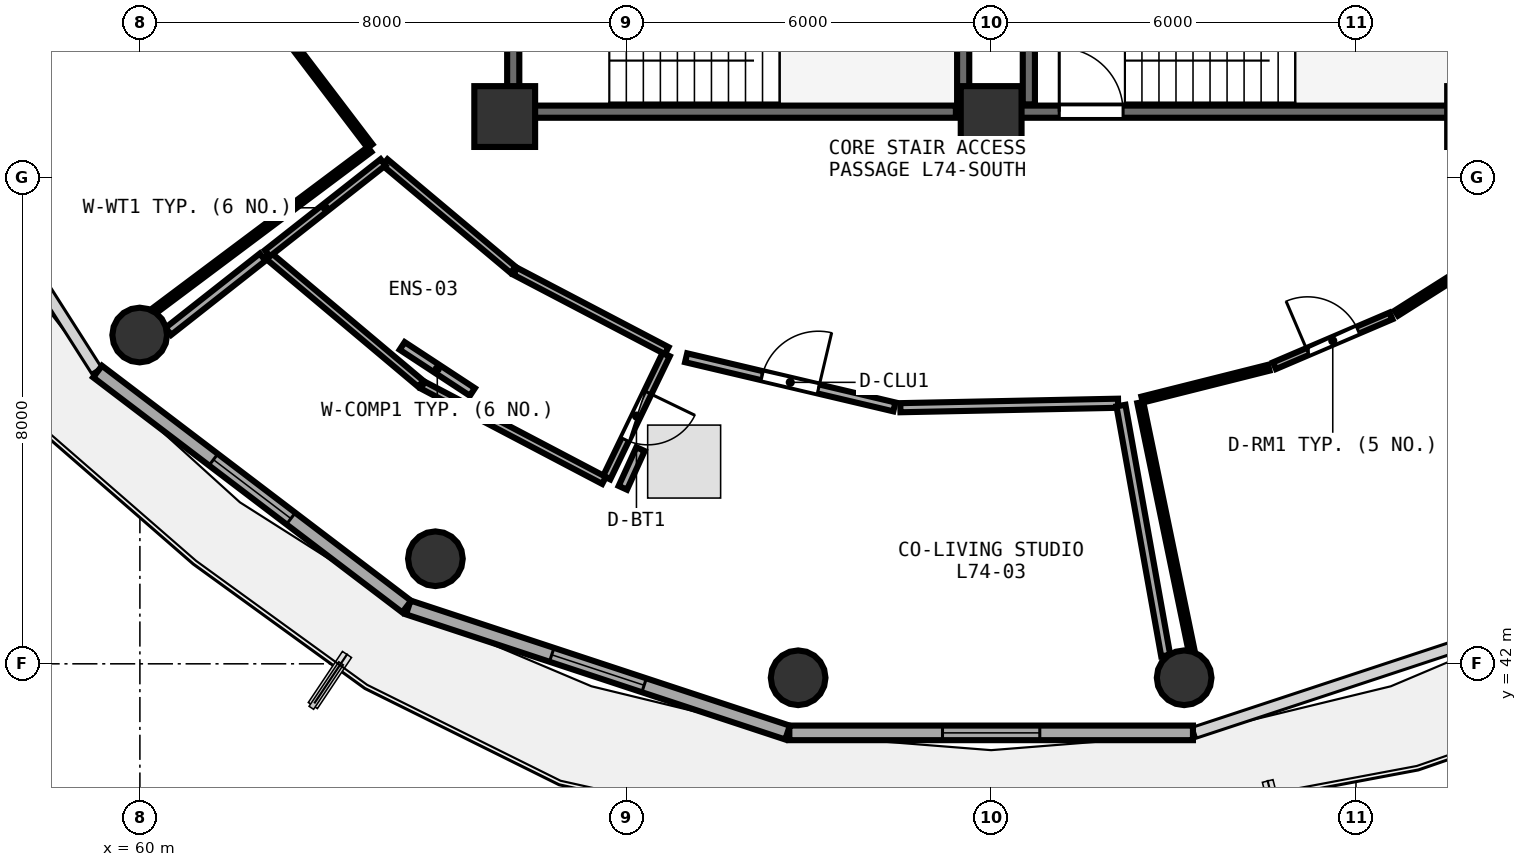
"""IFC4 building model, lengths in metres.
Left out: names, types, materials, properties, quantities, classifications, styles, units other than length and angle.
Written with IfcOpenShell. Run it as: python <this file> out.ifc"""

import sys

from ifc_helpers import new_model, si_unit, direction, frame, frame_2d, origin, origin_2d, place, context, subcontext, project, spatial, rectangle, circle, extrude, element, fill, save


model = new_model("IFC4")
c1 = context("Model", 3, precision=1e-05, world=origin(), true_north=direction((0.0, 1.0)))
c2 = subcontext(c1, "Body", "Model", "MODEL_VIEW")
j1 = project(units=[si_unit("LENGTHUNIT", "METRE"), si_unit("PLANEANGLEUNIT", "RADIAN")], contexts=[c1])
p1 = place(None, origin())
s1 = spatial("IfcSite", under=j1, at=p1, CompositionType="ELEMENT")
p2 = place(p1, origin())
s2 = spatial("IfcBuilding", under=s1, at=p2, CompositionType="ELEMENT")
p3 = place(p2, frame((0.0, 0.0, 289.95)))
s3 = spatial("IfcBuildingStorey", under=s2, at=p3, CompositionType="ELEMENT", Elevation=289.95)
for number, where, z_axis, x_axis in (
    (1, (66.0, 51.0, 0.0), (0.0, 0.0, 1.0), (1.0, 0.0, 0.0)),
    (2, (74.0, 51.0, 0.0), (0.0, 0.0, 1.0), (1.0, 0.0, 0.0)),
):
    element("IfcColumn", number, at=place(p3, frame(where, z_axis=z_axis, x_axis=x_axis)), inside=s3, PredefinedType="PILASTER", context=c2, shape_type="SweptSolid", body=[
        extrude(rectangle(XDim=1.0, YDim=1.0, at=origin_2d()), origin(), (0.0, 0.0, 1.0), 3.75),
    ])
for number, where, z_axis, x_axis in (
    (3, (59.997, 47.407, 0.0), (0.0, 0.0, 1.0), (1.0, 0.0, 0.0)),
    (4, (64.86, 43.728, 0.0), (0.0, 0.0, 1.0), (1.0, 0.0, 0.0)),
    (5, (70.826, 41.771, 0.0), (0.0, 0.0, 1.0), (1.0, 0.0, 0.0)),
    (6, (77.174, 41.771, 0.0), (0.0, 0.0, 1.0), (1.0, 0.0, 0.0)),
):
    element("IfcColumn", number, at=place(p3, frame(where, z_axis=z_axis, x_axis=x_axis)), inside=s3, PredefinedType="COLUMN", context=c2, shape_type="SweptSolid", body=[
        extrude(circle(Radius=0.45, at=origin_2d()), origin(), (0.0, 0.0, 1.0), 3.75),
    ])
p4 = place(p3, frame((59.304, 46.806, 0.0), z_axis=(0.0, 0.0, 1.0), x_axis=(0.796010444211, -0.605282886514, 0.0)))
e7 = element("IfcWall", 7, at=p4, inside=s3, PredefinedType="SOLIDWALL", context=c2, shape_type="SweptSolid", body=[
    extrude(rectangle(XDim=6.387, YDim=0.24, at=frame_2d((3.194, 0.0))), origin(), (0.0, 0.0, 1.0), 3.415),
])
p5 = place(p4, frame((2.394, 0.0, 0.85)))
e8 = element("IfcOpeningElement", 8, at=p5, cuts=e7, PredefinedType="OPENING", context=c2, shape_type="SweptSolid", body=[
    extrude(rectangle(XDim=1.6, YDim=1.45, at=frame_2d((0.8, 0.725))), frame((0.0, 0.13, 0.0), z_axis=(0.0, -1.0, 0.0), x_axis=(1.0, 0.0, 0.0)), (0.0, 0.0, 1.0), 0.26),
])
p6 = place(p3, frame((64.414, 42.927, 0.0), z_axis=(0.0, 0.0, 1.0), x_axis=(0.949663708393, -0.313271193954, 0.0)))
e9 = element("IfcWall", 9, at=p6, inside=s3, PredefinedType="SOLIDWALL", context=c2, shape_type="SweptSolid", body=[
    extrude(rectangle(XDim=6.568, YDim=0.24, at=frame_2d((3.284, 0.0))), origin(), (0.0, 0.0, 1.0), 3.415),
])
p7 = place(p6, frame((2.484, 0.0, 0.85)))
e10 = element("IfcOpeningElement", 10, at=p7, cuts=e9, PredefinedType="OPENING", context=c2, shape_type="SweptSolid", body=[
    extrude(rectangle(XDim=1.6, YDim=1.45, at=frame_2d((0.8, 0.725))), frame((0.0, 0.13, 0.0), z_axis=(0.0, -1.0, 0.0), x_axis=(1.0, 0.0, 0.0)), (0.0, 0.0, 1.0), 0.26),
])
p8 = place(p3, frame((70.681, 40.864, 0.0), z_axis=(0.0, 0.0, 1.0), x_axis=(1.0, 0.0, 0.0)))
e11 = element("IfcWall", 11, at=p8, inside=s3, PredefinedType="SOLIDWALL", context=c2, shape_type="SweptSolid", body=[
    extrude(rectangle(XDim=6.638, YDim=0.24, at=frame_2d((3.319, 0.0))), origin(), (0.0, 0.0, 1.0), 3.415),
])
p9 = place(p8, frame((2.519, 0.0, 0.85)))
e12 = element("IfcOpeningElement", 12, at=p9, cuts=e11, PredefinedType="OPENING", context=c2, shape_type="SweptSolid", body=[
    extrude(rectangle(XDim=1.6, YDim=1.45, at=frame_2d((0.8, 0.725))), frame((0.0, 0.13, 0.0), z_axis=(0.0, -1.0, 0.0), x_axis=(1.0, 0.0, 0.0)), (0.0, 0.0, 1.0), 0.26),
])
p10 = place(p3, frame((74.0, 51.08, 0.0), z_axis=(0.0, 0.0, 1.0), x_axis=(1.0, 0.0, 0.0)))
e13 = element("IfcWall", 13, at=p10, inside=s3, PredefinedType="SHEAR", context=c2, shape_type="SweptSolid", body=[
    extrude(rectangle(XDim=7.9, YDim=0.2, at=frame_2d((3.95, 0.0))), origin(), (0.0, 0.0, 1.0), 3.43),
])
p11 = place(p10, frame((1.12, 0.0, 0.0)))
e14 = element("IfcOpeningElement", 14, at=p11, cuts=e13, PredefinedType="OPENING", context=c2, shape_type="SweptSolid", body=[
    extrude(rectangle(XDim=1.05, YDim=2.1, at=frame_2d((0.525, 1.05))), frame((0.0, 0.11, 0.0), z_axis=(0.0, -1.0, 0.0), x_axis=(1.0, 0.0, 0.0)), (0.0, 0.0, 1.0), 0.22),
])
p12 = place(p3, frame((74.62, 54.27, 0.0), z_axis=(0.0, 0.0, 1.0), x_axis=(0.0, -1.0, 0.0)))
e15 = element("IfcWall", 15, at=p12, inside=s3, PredefinedType="SHEAR", context=c2, shape_type="SweptSolid", body=[
    extrude(rectangle(XDim=3.07, YDim=0.2, at=frame_2d((1.535, 0.0))), origin(), (0.0, 0.0, 1.0), 3.43),
])
p13 = place(p3, frame((66.26, 51.08, 0.0), z_axis=(0.0, 0.0, 1.0), x_axis=(1.0, 0.0, 0.0)))
e16 = element("IfcWall", 16, at=p13, inside=s3, PredefinedType="SHEAR", context=c2, shape_type="SweptSolid", body=[
    extrude(rectangle(XDim=7.16, YDim=0.2, at=frame_2d((3.58, 0.0))), origin(), (0.0, 0.0, 1.0), 3.43),
])
p14 = place(p3, frame((73.54, 51.2, 0.0), z_axis=(0.0, 0.0, 1.0), x_axis=(0.0, 1.0, 0.0)))
e17 = element("IfcWall", 17, at=p14, inside=s3, PredefinedType="SHEAR", context=c2, shape_type="SweptSolid", body=[
    extrude(rectangle(XDim=3.07, YDim=0.2, at=frame_2d((1.535, 0.0))), origin(), (0.0, 0.0, 1.0), 3.43),
])
p15 = place(p3, frame((66.14, 54.27, 0.0), z_axis=(0.0, 0.0, 1.0), x_axis=(0.0, -1.0, 0.0)))
e18 = element("IfcWall", 18, at=p15, inside=s3, PredefinedType="SHEAR", context=c2, shape_type="SweptSolid", body=[
    extrude(rectangle(XDim=3.07, YDim=0.2, at=frame_2d((1.535, 0.0))), origin(), (0.0, 0.0, 1.0), 3.43),
])
p16 = place(p15, frame((1.01, 0.0, 0.0)))
e19 = element("IfcOpeningElement", 19, at=p16, cuts=e18, PredefinedType="OPENING", context=c2, shape_type="SweptSolid", body=[
    extrude(rectangle(XDim=1.05, YDim=2.1, at=frame_2d((0.525, 1.05))), frame((0.0, 0.11, 0.0), z_axis=(0.0, -1.0, 0.0), x_axis=(1.0, 0.0, 0.0)), (0.0, 0.0, 1.0), 0.22),
])
p17 = place(p3, frame((68.656, 47.087, 0.0), z_axis=(0.0, 0.0, 1.0), x_axis=(-0.435107089182, -0.900378709735, 0.0)))
e20 = element("IfcWall", 20, at=p17, inside=s3, PredefinedType="PLUMBINGWALL", context=c2, shape_type="SweptSolid", body=[
    extrude(rectangle(XDim=2.25, YDim=0.13, at=frame_2d((1.125, 0.0))), origin(), (0.0, 0.0, 1.0), 3.115),
])
p18 = place(p17, frame((0.695, 0.0, 0.0)))
e21 = element("IfcOpeningElement", 21, at=p18, cuts=e20, PredefinedType="OPENING", context=c2, shape_type="SweptSolid", body=[
    extrude(rectangle(XDim=0.86, YDim=2.05, at=frame_2d((0.43, 1.025))), frame((0.0, 0.075, 0.0), z_axis=(0.0, -1.0, 0.0), x_axis=(1.0, 0.0, 0.0)), (0.0, 0.0, 1.0), 0.15),
])
p19 = place(p3, frame((68.983, 47.033, 0.0), z_axis=(0.0, 0.0, 1.0), x_axis=(0.973265021884, -0.229684995542, 0.0)))
e22 = element("IfcWall", 22, at=p19, inside=s3, PredefinedType="PARTITIONING", context=c2, shape_type="SweptSolid", body=[
    extrude(rectangle(XDim=3.519, YDim=0.15, at=frame_2d((1.76, 0.0))), origin(), (0.0, 0.0, 1.0), 3.015),
])
p20 = place(p19, frame((1.285, 0.0, 0.0)))
e23 = element("IfcOpeningElement", 23, at=p20, cuts=e22, PredefinedType="OPENING", context=c2, shape_type="SweptSolid", body=[
    extrude(rectangle(XDim=0.95, YDim=2.08, at=frame_2d((0.475, 1.04))), frame((0.0, 0.085, 0.0), z_axis=(0.0, -1.0, 0.0), x_axis=(1.0, 0.0, 0.0)), (0.0, 0.0, 1.0), 0.17),
])
p21 = place(p3, frame((78.66, 46.903, 0.0), z_axis=(0.0, 0.0, 1.0), x_axis=(0.919508345424, 0.39307048057, 0.0)))
e24 = element("IfcWall", 24, at=p21, inside=s3, PredefinedType="PARTITIONING", context=c2, shape_type="SweptSolid", body=[
    extrude(rectangle(XDim=2.083, YDim=0.12, at=frame_2d((1.042, 0.0))), origin(), (0.0, 0.0, 1.0), 3.42),
])
p22 = place(p21, frame((0.592, 0.0, 0.0)))
e25 = element("IfcOpeningElement", 25, at=p22, cuts=e24, PredefinedType="OPENING", context=c2, shape_type="SweptSolid", body=[
    extrude(rectangle(XDim=0.9, YDim=2.08, at=frame_2d((0.45, 1.04))), frame((0.0, 0.07, 0.0), z_axis=(0.0, -1.0, 0.0), x_axis=(1.0, 0.0, 0.0)), (0.0, 0.0, 1.0), 0.14),
])
p23 = place(p3, frame((62.565, 52.117, 0.0), z_axis=(0.0, 0.0, 1.0), x_axis=(0.605473441765, -0.795865510823, 0.0)))
e26 = element("IfcWall", 26, at=p23, inside=s3, PredefinedType="PARTITIONING", context=c2, shape_type="SweptSolid", body=[
    extrude(rectangle(XDim=2.014, YDim=0.1, at=frame_2d((1.007, 0.0))), origin(), (0.0, 0.0, 1.0), 3.015),
])
p24 = place(p3, frame((63.777, 50.458, 0.0), z_axis=(0.0, 0.0, 1.0), x_axis=(-0.800384816546, -0.599486568191, 0.0)))
e27 = element("IfcWall", 27, at=p24, inside=s3, PredefinedType="PARTITIONING", context=c2, shape_type="SweptSolid", body=[
    extrude(rectangle(XDim=4.414, YDim=0.1, at=frame_2d((2.207, 0.0))), origin(), (0.0, 0.0, 1.0), 3.115),
])
p25 = place(p3, frame((64.03, 50.247, 0.0), z_axis=(0.0, 0.0, 1.0), x_axis=(0.766167599315, -0.642640809286, 0.0)))
e28 = element("IfcWall", 28, at=p25, inside=s3, PredefinedType="PLUMBINGWALL", context=c2, shape_type="SweptSolid", body=[
    extrude(rectangle(XDim=2.753, YDim=0.13, at=frame_2d((1.376, 0.0))), origin(), (0.0, 0.0, 1.0), 3.015),
])
p26 = place(p3, frame((66.173, 48.456, 0.0), z_axis=(0.0, 0.0, 1.0), x_axis=(0.885795858503, -0.464075098512, 0.0)))
e29 = element("IfcWall", 29, at=p26, inside=s3, PredefinedType="PLUMBINGWALL", context=c2, shape_type="SweptSolid", body=[
    extrude(rectangle(XDim=2.813, YDim=0.13, at=frame_2d((1.406, 0.0))), origin(), (0.0, 0.0, 1.0), 3.175),
])
p27 = place(p3, frame((67.633, 45.016, 0.0), z_axis=(0.0, 0.0, 1.0), x_axis=(-0.885210583291, 0.465190523581, 0.0)))
e30 = element("IfcWall", 30, at=p27, inside=s3, PredefinedType="PLUMBINGWALL", context=c2, shape_type="SweptSolid", body=[
    extrude(rectangle(XDim=3.367, YDim=0.13, at=frame_2d((1.684, 0.0))), origin(), (0.0, 0.0, 1.0), 3.015),
])
p28 = place(p3, frame((64.62, 46.605, 0.0), z_axis=(0.0, 0.0, 1.0), x_axis=(-0.765494729633, 0.643442164382, 0.0)))
e31 = element("IfcWall", 31, at=p28, inside=s3, PredefinedType="PLUMBINGWALL", context=c2, shape_type="SweptSolid", body=[
    extrude(rectangle(XDim=3.296, YDim=0.13, at=frame_2d((1.648, 0.0))), origin(), (0.0, 0.0, 1.0), 3.015),
])
p29 = place(p3, frame((62.097, 48.751, 0.0), z_axis=(0.0, 0.0, 1.0), x_axis=(0.786076764473, 0.618128886525, 0.0)))
e32 = element("IfcWall", 32, at=p29, inside=s3, PredefinedType="PLUMBINGWALL", context=c2, shape_type="SweptSolid", body=[
    extrude(rectangle(XDim=2.42, YDim=0.13, at=frame_2d((1.21, 0.0))), origin(), (0.0, 0.0, 1.0), 3.015),
])
p30 = place(p3, frame((72.507, 46.212, 0.0), z_axis=(0.0, 0.0, 1.0), x_axis=(0.999790880908, 0.02044980325, 0.0)))
e33 = element("IfcWall", 33, at=p30, inside=s3, PredefinedType="PARTITIONING", context=c2, shape_type="SweptSolid", body=[
    extrude(rectangle(XDim=3.582, YDim=0.15, at=frame_2d((1.791, 0.0))), origin(), (0.0, 0.0, 1.0), 3.015),
])
p31 = place(p3, frame((76.135, 46.247, 0.0), z_axis=(0.0, 0.0, 1.0), x_axis=(0.176199339585, -0.984354505618, 0.0)))
e34 = element("IfcWall", 34, at=p31, inside=s3, PredefinedType="PARTITIONING", context=c2, shape_type="SweptSolid", body=[
    extrude(rectangle(XDim=4.176, YDim=0.15, at=frame_2d((2.088, 0.0))), origin(), (0.0, 0.0, 1.0), 3.015),
])
p32 = place(p3, frame((60.468, 47.468, 0.0), z_axis=(0.0, 0.0, 1.0), x_axis=(0.785768578647, 0.618520606618, 0.0)))
e35 = element("IfcWall", 35, at=p32, inside=s3, PredefinedType="PARTITIONING", context=c2, shape_type="SweptSolid", body=[
    extrude(rectangle(XDim=1.974, YDim=0.15, at=frame_2d((0.987, 0.0))), origin(), (0.0, 0.0, 1.0), 3.015),
])
p33 = place(p3, frame((64.314, 47.228, 0.0), z_axis=(0.0, 0.0, 1.0), x_axis=(0.836108744157, -0.54856373189, 0.0)))
e36 = element("IfcWall", 36, at=p33, inside=s3, PredefinedType="PARTITIONING", context=c2, shape_type="SweptSolid", body=[
    extrude(rectangle(XDim=1.381, YDim=0.15, at=frame_2d((0.69, 0.0))), origin(), (0.0, 0.0, 1.0), 3.015),
])
p34 = place(p3, frame((67.943, 44.894, 0.0), z_axis=(0.0, 0.0, 1.0), x_axis=(0.415116627058, 0.909768204511, 0.0)))
e37 = element("IfcWall", 37, at=p34, inside=s3, PredefinedType="PARTITIONING", context=c2, shape_type="SweptSolid", body=[
    extrude(rectangle(XDim=0.7, YDim=0.15, at=frame_2d((0.35, 0.0))), origin(), (0.0, 0.0, 1.0), 3.42),
])
p35 = place(p3, frame((76.484, 46.346, 0.0), z_axis=(0.0, 0.0, 1.0), x_axis=(0.969827312174, 0.243792913272, 0.0)))
e38 = element("IfcWall", 38, at=p35, inside=s3, PredefinedType="PARTITIONING", context=c2, shape_type="SweptSolid", body=[
    extrude(rectangle(XDim=2.147, YDim=0.1, at=frame_2d((1.073, 0.0))), origin(), (0.0, 0.0, 1.0), 3.42),
])
p36 = place(p3, frame((80.665, 47.766, 0.0), z_axis=(0.0, 0.0, 1.0), x_axis=(0.844856002064, 0.534993771717, 0.0)))
e39 = element("IfcWall", 39, at=p36, inside=s3, PredefinedType="PARTITIONING", context=c2, shape_type="SweptSolid", body=[
    extrude(rectangle(XDim=2.092, YDim=0.1, at=frame_2d((1.046, 0.0))), origin(), (0.0, 0.0, 1.0), 3.015),
])
p37 = place(p3, frame((77.293, 42.23, 0.0), z_axis=(0.0, 0.0, 1.0), x_axis=(-0.202308141573, 0.979321916355, 0.0)))
e40 = element("IfcWall", 40, at=p37, inside=s3, PredefinedType="PARTITIONING", context=c2, shape_type="SweptSolid", body=[
    extrude(rectangle(XDim=4.153, YDim=0.1, at=frame_2d((2.076, 0.0))), origin(), (0.0, 0.0, 1.0), 3.115),
])
p38 = place(p5, origin())
e41 = element("IfcWindow", 41, at=p38, inside=s3, PartitioningType="SINGLE_PANEL", PredefinedType="WINDOW", context=c2, shape_type="SweptSolid", body=[
    extrude(rectangle(XDim=1.6, YDim=1.45, at=frame_2d((0.8, 0.725))), frame((0.0, 0.03, 0.0), z_axis=(0.0, -1.0, 0.0), x_axis=(1.0, 0.0, 0.0)), (0.0, 0.0, 1.0), 0.06),
])
fill(e8, e41)
p39 = place(p7, origin())
e42 = element("IfcWindow", 42, at=p39, inside=s3, PartitioningType="SINGLE_PANEL", PredefinedType="WINDOW", context=c2, shape_type="SweptSolid", body=[
    extrude(rectangle(XDim=1.6, YDim=1.45, at=frame_2d((0.8, 0.725))), frame((0.0, 0.03, 0.0), z_axis=(0.0, -1.0, 0.0), x_axis=(1.0, 0.0, 0.0)), (0.0, 0.0, 1.0), 0.06),
])
fill(e10, e42)
p40 = place(p9, origin())
e43 = element("IfcWindow", 43, at=p40, inside=s3, PartitioningType="SINGLE_PANEL", PredefinedType="WINDOW", context=c2, shape_type="SweptSolid", body=[
    extrude(rectangle(XDim=1.6, YDim=1.45, at=frame_2d((0.8, 0.725))), frame((0.0, 0.03, 0.0), z_axis=(0.0, -1.0, 0.0), x_axis=(1.0, 0.0, 0.0)), (0.0, 0.0, 1.0), 0.06),
])
fill(e12, e43)
p41 = place(p11, origin())
e44 = element("IfcDoor", 44, at=p41, inside=s3, OperationType="SINGLE_SWING_LEFT", PredefinedType="DOOR", context=c2, shape_type="SweptSolid", body=[
    extrude(rectangle(XDim=1.05, YDim=2.1, at=frame_2d((0.525, 1.05))), frame((0.0, 0.025, 0.0), z_axis=(0.0, -1.0, 0.0), x_axis=(1.0, 0.0, 0.0)), (0.0, 0.0, 1.0), 0.05),
])
fill(e14, e44)
p42 = place(p18, origin())
e45 = element("IfcDoor", 45, at=p42, inside=s3, OperationType="SINGLE_SWING_LEFT", PredefinedType="DOOR", context=c2, shape_type="SweptSolid", body=[
    extrude(rectangle(XDim=0.86, YDim=2.05, at=frame_2d((0.43, 1.025))), frame((0.0, 0.025, 0.0), z_axis=(0.0, -1.0, 0.0), x_axis=(1.0, 0.0, 0.0)), (0.0, 0.0, 1.0), 0.05),
])
fill(e21, e45)
p43 = place(p20, origin())
e46 = element("IfcDoor", 46, at=p43, inside=s3, OperationType="SINGLE_SWING_RIGHT", PredefinedType="DOOR", context=c2, shape_type="SweptSolid", body=[
    extrude(rectangle(XDim=0.95, YDim=2.08, at=frame_2d((0.475, 1.04))), frame((0.0, 0.025, 0.0), z_axis=(0.0, -1.0, 0.0), x_axis=(1.0, 0.0, 0.0)), (0.0, 0.0, 1.0), 0.05),
])
fill(e23, e46)
p44 = place(p22, origin())
e47 = element("IfcDoor", 47, at=p44, inside=s3, OperationType="SINGLE_SWING_LEFT", PredefinedType="DOOR", context=c2, shape_type="SweptSolid", body=[
    extrude(rectangle(XDim=0.9, YDim=2.08, at=frame_2d((0.45, 1.04))), frame((0.0, 0.025, 0.0), z_axis=(0.0, -1.0, 0.0), x_axis=(1.0, 0.0, 0.0)), (0.0, 0.0, 1.0), 0.05),
])
fill(e25, e47)
save(model, sys.argv[1])
